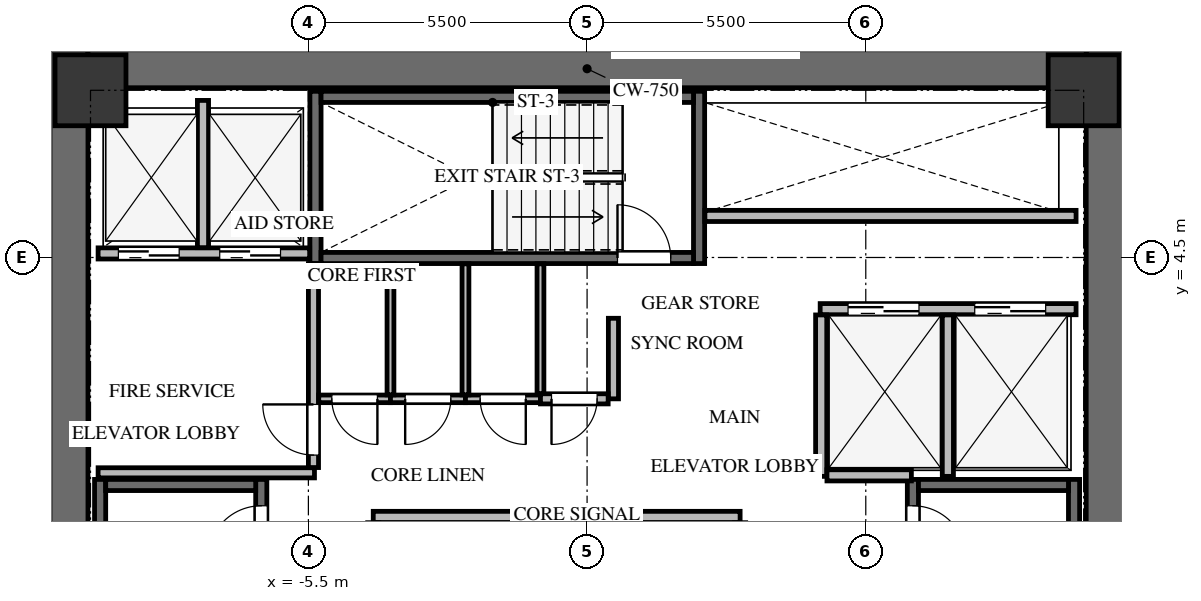
"""IFC4 building model, lengths in metres.
Left out: names, types, materials, properties, quantities, classifications, styles, units other than length and angle.
Written with IfcOpenShell. Run it as: python <this file> out.ifc"""

import sys

from ifc_helpers import new_model, si_unit, direction, frame, frame_2d, origin, origin_2d, place, context, subcontext, project, spatial, rectangle, extrude, source, transform, mapped, element, fill, save


model = new_model("IFC4")
c1 = context("Model", 3, precision=1e-05, world=origin(), true_north=direction((0.0, 1.0)))
c2 = subcontext(c1, "Body", "Model", "MODEL_VIEW")
j1 = project(units=[si_unit("LENGTHUNIT", "METRE"), si_unit("PLANEANGLEUNIT", "RADIAN")], contexts=[c1])
p1 = place(None, origin())
s1 = spatial("IfcSite", under=j1, at=p1, CompositionType="ELEMENT")
p2 = place(p1, origin())
s2 = spatial("IfcBuilding", under=s1, at=p2, CompositionType="ELEMENT")
p3 = place(p2, frame((0.0, 0.0, 123.9)))
s3 = spatial("IfcBuildingStorey", under=s2, at=p3, CompositionType="ELEMENT", Elevation=123.9)
for number, where, z_axis, x_axis in (
    (1, (-10.225, -8.6, 0.0), (0.0, 0.0, 1.0), (0.0, 1.0, 0.0)),
    (2, (10.225, -8.6, 0.0), (0.0, 0.0, 1.0), (0.0, 1.0, 0.0)),
):
    element("IfcWall", number, at=place(p3, frame(where, z_axis=z_axis, x_axis=x_axis)), inside=s3, PredefinedType="SHEAR", context=c2, shape_type="SweptSolid", body=[
        extrude(rectangle(XDim=17.2, YDim=0.75, at=frame_2d((8.6, 0.0))), origin(), (0.0, 0.0, 1.0), 3.3),
    ])
p4 = place(p3, frame((-9.85, 8.225, 0.0), z_axis=(0.0, 0.0, 1.0), x_axis=(1.0, 0.0, 0.0)))
e3 = element("IfcWall", 3, at=p4, inside=s3, PredefinedType="SHEAR", context=c2, shape_type="SweptSolid", body=[
    extrude(rectangle(XDim=19.7, YDim=0.75, at=frame_2d((9.85, 0.0))), origin(), (0.0, 0.0, 1.0), 3.3),
])
p5 = place(p3, frame((-6.43, -7.77, -0.24), z_axis=(0.0, 0.0, 1.0), x_axis=(0.0, 1.0, 0.0)))
e4 = element("IfcWall", 4, at=p5, inside=s3, PredefinedType="SHEAR", context=c2, shape_type="SweptSolid", body=[
    extrude(rectangle(XDim=7.89, YDim=0.22, at=frame_2d((3.945, 0.0))), origin(), (0.0, 0.0, 1.0), 3.3),
])
p6 = place(p5, frame((6.32, 0.0, 0.0)))
e5 = element("IfcOpeningElement", 5, at=p6, cuts=e4, PredefinedType="OPENING", context=c2, shape_type="SweptSolid", body=[
    extrude(rectangle(XDim=1.05, YDim=2.15, at=frame_2d((0.525, 1.075))), frame((0.0, 0.12, 0.0), z_axis=(0.0, -1.0, 0.0), x_axis=(1.0, 0.0, 0.0)), (0.0, 0.0, 1.0), 0.24),
])
p7 = place(p3, frame((-9.61, 0.12, -0.24), z_axis=(0.0, 0.0, 1.0), x_axis=(0.0, -1.0, 0.0)))
e6 = element("IfcWall", 6, at=p7, inside=s3, PredefinedType="SHEAR", context=c2, shape_type="SweptSolid", body=[
    extrude(rectangle(XDim=7.89, YDim=0.22, at=frame_2d((3.945, 0.0))), origin(), (0.0, 0.0, 1.0), 3.3),
])
p8 = place(p3, frame((-6.54, 0.01, -0.24), z_axis=(0.0, 0.0, 1.0), x_axis=(-1.0, 0.0, 0.0)))
e7 = element("IfcWall", 7, at=p8, inside=s3, PredefinedType="SHEAR", context=c2, shape_type="SweptSolid", body=[
    extrude(rectangle(XDim=2.96, YDim=0.22, at=frame_2d((1.48, 0.0))), origin(), (0.0, 0.0, 1.0), 3.3),
])
p9 = place(p3, frame((9.61, -7.77, -0.24), z_axis=(0.0, 0.0, 1.0), x_axis=(0.0, 1.0, 0.0)))
e8 = element("IfcWall", 8, at=p9, inside=s3, PredefinedType="SHEAR", context=c2, shape_type="SweptSolid", body=[
    extrude(rectangle(XDim=7.89, YDim=0.22, at=frame_2d((3.945, 0.0))), origin(), (0.0, 0.0, 1.0), 3.3),
])
p10 = place(p3, frame((6.43, 0.12, -0.24), z_axis=(0.0, 0.0, 1.0), x_axis=(0.0, -1.0, 0.0)))
e9 = element("IfcWall", 9, at=p10, inside=s3, PredefinedType="SHEAR", context=c2, shape_type="SweptSolid", body=[
    extrude(rectangle(XDim=7.89, YDim=0.22, at=frame_2d((3.945, 0.0))), origin(), (0.0, 0.0, 1.0), 3.3),
])
p11 = place(p10, frame((0.52, 0.0, 0.0)))
e10 = element("IfcOpeningElement", 10, at=p11, cuts=e9, PredefinedType="OPENING", context=c2, shape_type="SweptSolid", body=[
    extrude(rectangle(XDim=1.05, YDim=2.15, at=frame_2d((0.525, 1.075))), frame((0.0, 0.12, 0.0), z_axis=(0.0, -1.0, 0.0), x_axis=(1.0, 0.0, 0.0)), (0.0, 0.0, 1.0), 0.24),
])
p12 = place(p3, frame((9.5, 0.01, -0.24), z_axis=(0.0, 0.0, 1.0), x_axis=(-1.0, 0.0, 0.0)))
e11 = element("IfcWall", 11, at=p12, inside=s3, PredefinedType="SHEAR", context=c2, shape_type="SweptSolid", body=[
    extrude(rectangle(XDim=2.96, YDim=0.22, at=frame_2d((1.48, 0.0))), origin(), (0.0, 0.0, 1.0), 3.3),
])
for number, where, z_axis, x_axis in (
    (12, (2.21, 4.38, -0.24), (0.0, 0.0, 1.0), (0.0, 1.0, 0.0)),
    (13, (-5.36, 7.78, -0.24), (0.0, 0.0, 1.0), (0.0, -1.0, 0.0)),
):
    element("IfcWall", number, at=place(p3, frame(where, z_axis=z_axis, x_axis=x_axis)), inside=s3, PredefinedType="SHEAR", context=c2, shape_type="SweptSolid", body=[
        extrude(rectangle(XDim=3.4, YDim=0.22, at=frame_2d((1.7, 0.0))), origin(), (0.0, 0.0, 1.0), 3.3),
    ])
p13 = place(p3, frame((-5.25, 4.49, -0.24), z_axis=(0.0, 0.0, 1.0), x_axis=(1.0, 0.0, 0.0)))
e14 = element("IfcWall", 14, at=p13, inside=s3, PredefinedType="SHEAR", context=c2, shape_type="SweptSolid", body=[
    extrude(rectangle(XDim=7.35, YDim=0.22, at=frame_2d((3.675, 0.0))), origin(), (0.0, 0.0, 1.0), 3.3),
])
p14 = place(p13, frame((5.85, 0.0, 0.0)))
e15 = element("IfcOpeningElement", 15, at=p14, cuts=e14, PredefinedType="OPENING", context=c2, shape_type="SweptSolid", body=[
    extrude(rectangle(XDim=1.05, YDim=2.15, at=frame_2d((0.525, 1.075))), frame((0.0, 0.12, 0.0), z_axis=(0.0, -1.0, 0.0), x_axis=(1.0, 0.0, 0.0)), (0.0, 0.0, 1.0), 0.24),
])
p15 = place(p3, frame((2.1, 7.67, -0.24), z_axis=(0.0, 0.0, 1.0), x_axis=(-1.0, 0.0, 0.0)))
e16 = element("IfcWall", 16, at=p15, inside=s3, PredefinedType="SHEAR", context=c2, shape_type="SweptSolid", body=[
    extrude(rectangle(XDim=7.35, YDim=0.22, at=frame_2d((3.675, 0.0))), origin(), (0.0, 0.0, 1.0), 3.3),
])
m1 = source(origin(), c2, "Body", "SweptSolid", [
    extrude(rectangle(XDim=1.4, YDim=1.4, at=origin_2d()), origin(), (0.0, 0.0, 1.0), 3.3),
])
for number, where, z_axis, x_axis in (
    (17, (9.8, 7.8, -0.24), (0.0, 0.0, 1.0), (1.0, 0.0, 0.0)),
    (18, (-9.8, 7.8, -0.24), (0.0, 0.0, 1.0), (1.0, 0.0, 0.0)),
):
    element("IfcColumn", number, at=place(p3, frame(where, z_axis=z_axis, x_axis=x_axis)), inside=s3, PredefinedType="COLUMN", context=c2, shape_type="MappedRepresentation", body=[
        mapped(m1, transform((0.0, 0.0, 0.0), x_axis=(1.0, 0.0, 0.0), y_axis=(0.0, 1.0, 0.0), z_axis=(0.0, 0.0, 1.0), scale=1.0)),
    ])
p16 = place(p3, frame((-9.65, 4.58, 0.0), z_axis=(0.0, 0.0, 1.0), x_axis=(1.0, 0.0, 0.0)))
e19 = element("IfcWall", 19, at=p16, inside=s3, PredefinedType="SOLIDWALL", context=c2, shape_type="SweptSolid", body=[
    extrude(rectangle(XDim=4.175, YDim=0.22, at=frame_2d((2.087, 0.0))), origin(), (0.0, 0.0, 1.0), 3.045),
])
p17 = place(p16, frame((0.4, 0.0, 0.0)))
e20 = element("IfcOpeningElement", 20, at=p17, cuts=e19, PredefinedType="OPENING", context=c2, shape_type="SweptSolid", body=[
    extrude(rectangle(XDim=1.2, YDim=2.15, at=frame_2d((0.6, 1.075))), frame((0.0, 0.12, 0.0), z_axis=(0.0, -1.0, 0.0), x_axis=(1.0, 0.0, 0.0)), (0.0, 0.0, 1.0), 0.24),
])
p18 = place(p16, frame((2.4, 0.0, 0.0)))
e21 = element("IfcOpeningElement", 21, at=p18, cuts=e19, PredefinedType="OPENING", context=c2, shape_type="SweptSolid", body=[
    extrude(rectangle(XDim=1.2, YDim=2.15, at=frame_2d((0.6, 1.075))), frame((0.0, 0.12, 0.0), z_axis=(0.0, -1.0, 0.0), x_axis=(1.0, 0.0, 0.0)), (0.0, 0.0, 1.0), 0.24),
])
p19 = place(p3, frame((-7.58, 4.694, 0.0), z_axis=(0.0, 0.0, 1.0), x_axis=(0.0, 1.0, 0.0)))
e22 = element("IfcWall", 22, at=p19, inside=s3, PredefinedType="SOLIDWALL", context=c2, shape_type="SweptSolid", body=[
    extrude(rectangle(XDim=2.906, YDim=0.22, at=frame_2d((1.453, 0.0))), origin(), (0.0, 0.0, 1.0), 3.045),
])
p20 = place(p3, frame((-9.65, 0.25, 0.0), z_axis=(0.0, 0.0, 1.0), x_axis=(1.0, 0.0, 0.0)))
e23 = element("IfcWall", 23, at=p20, inside=s3, PredefinedType="SOLIDWALL", context=c2, shape_type="SweptSolid", body=[
    extrude(rectangle(XDim=4.27, YDim=0.2, at=frame_2d((2.135, 0.0))), origin(), (0.0, 0.0, 1.0), 3.045),
])
p21 = place(p3, frame((-5.4, 0.354, 0.0), z_axis=(0.0, 0.0, 1.0), x_axis=(0.0, 1.0, 0.0)))
e24 = element("IfcWall", 24, at=p21, inside=s3, PredefinedType="SOLIDWALL", context=c2, shape_type="SweptSolid", body=[
    extrude(rectangle(XDim=4.026, YDim=0.2, at=frame_2d((2.013, 0.0))), origin(), (0.0, 0.0, 1.0), 3.045),
])
p22 = place(p21, frame((0.246, 0.0, 0.0)))
e25 = element("IfcOpeningElement", 25, at=p22, cuts=e24, PredefinedType="OPENING", context=c2, shape_type="SweptSolid", body=[
    extrude(rectangle(XDim=1.0, YDim=2.15, at=frame_2d((0.5, 1.075))), frame((0.0, 0.11, 0.0), z_axis=(0.0, -1.0, 0.0), x_axis=(1.0, 0.0, 0.0)), (0.0, 0.0, 1.0), 0.22),
])
p23 = place(p3, frame((4.6, 3.48, 0.0), z_axis=(0.0, 0.0, 1.0), x_axis=(1.0, 0.0, 0.0)))
e26 = element("IfcWall", 26, at=p23, inside=s3, PredefinedType="SOLIDWALL", context=c2, shape_type="SweptSolid", body=[
    extrude(rectangle(XDim=5.05, YDim=0.22, at=frame_2d((2.525, 0.0))), origin(), (0.0, 0.0, 1.0), 3.045),
])
p24 = place(p23, frame((0.55, 0.0, 0.0)))
e27 = element("IfcOpeningElement", 27, at=p24, cuts=e26, PredefinedType="OPENING", context=c2, shape_type="SweptSolid", body=[
    extrude(rectangle(XDim=1.4, YDim=2.15, at=frame_2d((0.7, 1.075))), frame((0.0, 0.12, 0.0), z_axis=(0.0, -1.0, 0.0), x_axis=(1.0, 0.0, 0.0)), (0.0, 0.0, 1.0), 0.24),
])
p25 = place(p23, frame((3.05, 0.0, 0.0)))
e28 = element("IfcOpeningElement", 28, at=p25, cuts=e26, PredefinedType="OPENING", context=c2, shape_type="SweptSolid", body=[
    extrude(rectangle(XDim=1.4, YDim=2.15, at=frame_2d((0.7, 1.075))), frame((0.0, 0.12, 0.0), z_axis=(0.0, -1.0, 0.0), x_axis=(1.0, 0.0, 0.0)), (0.0, 0.0, 1.0), 0.24),
])
for number, where, z_axis, x_axis in (
    (29, (4.62, 0.18, 0.0), (0.0, 0.0, 1.0), (0.0, 1.0, 0.0)),
    (30, (7.12, 0.18, 0.0), (0.0, 0.0, 1.0), (0.0, 1.0, 0.0)),
):
    element("IfcWall", number, at=place(p3, frame(where, z_axis=z_axis, x_axis=x_axis)), inside=s3, PredefinedType="SOLIDWALL", context=c2, shape_type="SweptSolid", body=[
        extrude(rectangle(XDim=3.186, YDim=0.22, at=frame_2d((1.593, 0.0))), origin(), (0.0, 0.0, 1.0), 3.045),
    ])
p26 = place(p3, frame((4.734, 0.2, 0.0), z_axis=(0.0, 0.0, 1.0), x_axis=(1.0, 0.0, 0.0)))
e31 = element("IfcWall", 31, at=p26, inside=s3, PredefinedType="SOLIDWALL", context=c2, shape_type="SweptSolid", body=[
    extrude(rectangle(XDim=1.666, YDim=0.22, at=frame_2d((0.833, 0.0))), origin(), (0.0, 0.0, 1.0), 3.045),
])
p27 = place(p3, frame((-4.22, -0.62, 0.0), z_axis=(0.0, 0.0, 1.0), x_axis=(1.0, 0.0, 0.0)))
e32 = element("IfcWall", 32, at=p27, inside=s3, PredefinedType="SOLIDWALL", context=c2, shape_type="SweptSolid", body=[
    extrude(rectangle(XDim=7.24, YDim=0.22, at=frame_2d((3.62, 0.0))), origin(), (0.0, 0.0, 1.0), 3.045),
])
p28 = place(p3, frame((2.325, 5.32, 0.0), z_axis=(0.0, 0.0, 1.0), x_axis=(1.0, 0.0, 0.0)))
e33 = element("IfcWall", 33, at=p28, inside=s3, PredefinedType="SOLIDWALL", context=c2, shape_type="SweptSolid", body=[
    extrude(rectangle(XDim=7.325, YDim=0.22, at=frame_2d((3.663, 0.0))), origin(), (0.0, 0.0, 1.0), 3.045),
])
p29 = place(p3, frame((-3.88, 1.71, 0.0), z_axis=(0.0, 0.0, 1.0), x_axis=(-1.0, 0.0, 0.0)))
e34 = element("IfcWall", 34, at=p29, inside=s3, PredefinedType="PARTITIONING", context=c2, shape_type="SweptSolid", body=[
    extrude(rectangle(XDim=1.416, YDim=0.15, at=frame_2d((0.708, 0.0))), origin(), (0.0, 0.0, 1.0), 3.045),
])
p30 = place(p29, frame((0.258, 0.0, 0.0)))
e35 = element("IfcOpeningElement", 35, at=p30, cuts=e34, PredefinedType="OPENING", context=c2, shape_type="SweptSolid", body=[
    extrude(rectangle(XDim=0.9, YDim=2.05, at=frame_2d((0.45, 1.025))), frame((0.0, 0.085, 0.0), z_axis=(0.0, -1.0, 0.0), x_axis=(1.0, 0.0, 0.0)), (0.0, 0.0, 1.0), 0.17),
])
p31 = place(p3, frame((-2.4, 1.71, 0.0), z_axis=(0.0, 0.0, 1.0), x_axis=(-1.0, 0.0, 0.0)))
e36 = element("IfcWall", 36, at=p31, inside=s3, PredefinedType="PARTITIONING", context=c2, shape_type="SweptSolid", body=[
    extrude(rectangle(XDim=1.48, YDim=0.15, at=frame_2d((0.74, 0.0))), origin(), (0.0, 0.0, 1.0), 3.045),
])
p32 = place(p31, frame((0.29, 0.0, 0.0)))
e37 = element("IfcOpeningElement", 37, at=p32, cuts=e36, PredefinedType="OPENING", context=c2, shape_type="SweptSolid", body=[
    extrude(rectangle(XDim=0.9, YDim=2.05, at=frame_2d((0.45, 1.025))), frame((0.0, 0.085, 0.0), z_axis=(0.0, -1.0, 0.0), x_axis=(1.0, 0.0, 0.0)), (0.0, 0.0, 1.0), 0.17),
])
p33 = place(p3, frame((-0.92, 1.71, 0.0), z_axis=(0.0, 0.0, 1.0), x_axis=(-1.0, 0.0, 0.0)))
e38 = element("IfcWall", 38, at=p33, inside=s3, PredefinedType="PARTITIONING", context=c2, shape_type="SweptSolid", body=[
    extrude(rectangle(XDim=1.48, YDim=0.15, at=frame_2d((0.74, 0.0))), origin(), (0.0, 0.0, 1.0), 3.045),
])
p34 = place(p33, frame((0.29, 0.0, 0.0)))
e39 = element("IfcOpeningElement", 39, at=p34, cuts=e38, PredefinedType="OPENING", context=c2, shape_type="SweptSolid", body=[
    extrude(rectangle(XDim=0.9, YDim=2.05, at=frame_2d((0.45, 1.025))), frame((0.0, 0.085, 0.0), z_axis=(0.0, -1.0, 0.0), x_axis=(1.0, 0.0, 0.0)), (0.0, 0.0, 1.0), 0.17),
])
p35 = place(p3, frame((0.52, 3.3, 0.0), z_axis=(0.0, 0.0, 1.0), x_axis=(0.0, -1.0, 0.0)))
e40 = element("IfcWall", 40, at=p35, inside=s3, PredefinedType="SOLIDWALL", context=c2, shape_type="SweptSolid", body=[
    extrude(rectangle(XDim=1.59, YDim=0.2, at=frame_2d((0.795, 0.0))), origin(), (0.0, 0.0, 1.0), 3.045),
])
p36 = place(p3, frame((0.416, 1.71, 0.0), z_axis=(0.0, 0.0, 1.0), x_axis=(-1.0, 0.0, 0.0)))
e41 = element("IfcWall", 41, at=p36, inside=s3, PredefinedType="SOLIDWALL", context=c2, shape_type="SweptSolid", body=[
    extrude(rectangle(XDim=1.336, YDim=0.2, at=frame_2d((0.668, 0.0))), origin(), (0.0, 0.0, 1.0), 3.045),
])
p37 = place(p36, frame((0.218, 0.0, 0.0)))
e42 = element("IfcOpeningElement", 42, at=p37, cuts=e41, PredefinedType="OPENING", context=c2, shape_type="SweptSolid", body=[
    extrude(rectangle(XDim=0.9, YDim=2.05, at=frame_2d((0.45, 1.025))), frame((0.0, 0.11, 0.0), z_axis=(0.0, -1.0, 0.0), x_axis=(1.0, 0.0, 0.0)), (0.0, 0.0, 1.0), 0.22),
])
for number, where, z_axis, x_axis in (
    (43, (-3.88, 4.375, 0.0), (0.0, 0.0, 1.0), (0.0, -1.0, 0.0)),
    (44, (-2.4, 4.375, 0.0), (0.0, 0.0, 1.0), (0.0, -1.0, 0.0)),
):
    element("IfcWall", number, at=place(p3, frame(where, z_axis=z_axis, x_axis=x_axis)), inside=s3, PredefinedType="PARTITIONING", context=c2, shape_type="SweptSolid", body=[
        extrude(rectangle(XDim=2.586, YDim=0.135, at=frame_2d((1.293, 0.0))), origin(), (0.0, 0.0, 1.0), 3.045),
    ])
p38 = place(p3, frame((-0.92, 4.375, 0.0), z_axis=(0.0, 0.0, 1.0), x_axis=(0.0, -1.0, 0.0)))
e45 = element("IfcWall", 45, at=p38, inside=s3, PredefinedType="PARTITIONING", context=c2, shape_type="SweptSolid", body=[
    extrude(rectangle(XDim=2.561, YDim=0.135, at=frame_2d((1.281, 0.0))), origin(), (0.0, 0.0, 1.0), 3.045),
])
m2 = source(origin(), c2, "Body", "SweptSolid", [
    extrude(rectangle(XDim=1.05, YDim=2.15, at=frame_2d((0.525, 1.075))), frame((0.0, 0.025, 0.0), z_axis=(0.0, -1.0, 0.0), x_axis=(1.0, 0.0, 0.0)), (0.0, 0.0, 1.0), 0.05),
])
p39 = place(p6, origin())
e46 = element("IfcDoor", 46, at=p39, inside=s3, OperationType="SINGLE_SWING_LEFT", PredefinedType="DOOR", context=c2, shape_type="MappedRepresentation", body=[
    mapped(m2, transform((0.0, 0.0, 0.0), x_axis=(1.0, 0.0, 0.0), y_axis=(0.0, 1.0, 0.0), z_axis=(0.0, 0.0, 1.0), scale=1.0)),
])
fill(e5, e46)
m3 = source(origin(), c2, "Body", "SweptSolid", [
    extrude(rectangle(XDim=1.05, YDim=2.15, at=frame_2d((0.525, 1.075))), frame((0.0, 0.025, 0.0), z_axis=(0.0, -1.0, 0.0), x_axis=(1.0, 0.0, 0.0)), (0.0, 0.0, 1.0), 0.05),
])
p40 = place(p11, origin())
e47 = element("IfcDoor", 47, at=p40, inside=s3, OperationType="SINGLE_SWING_RIGHT", PredefinedType="DOOR", context=c2, shape_type="MappedRepresentation", body=[
    mapped(m3, transform((0.0, 0.0, 0.0), x_axis=(1.0, 0.0, 0.0), y_axis=(0.0, 1.0, 0.0), z_axis=(0.0, 0.0, 1.0), scale=1.0)),
])
fill(e10, e47)
p41 = place(p14, origin())
e48 = element("IfcDoor", 48, at=p41, inside=s3, OperationType="SINGLE_SWING_LEFT", PredefinedType="DOOR", context=c2, shape_type="MappedRepresentation", body=[
    mapped(m2, transform((0.0, 0.0, 0.0), x_axis=(1.0, 0.0, 0.0), y_axis=(0.0, 1.0, 0.0), z_axis=(0.0, 0.0, 1.0), scale=1.0)),
])
fill(e15, e48)
m4 = source(origin(), c2, "Body", "SweptSolid", [
    extrude(rectangle(XDim=1.2, YDim=2.15, at=frame_2d((0.6, 1.075))), frame((0.0, 0.025, 0.0), z_axis=(0.0, -1.0, 0.0), x_axis=(1.0, 0.0, 0.0)), (0.0, 0.0, 1.0), 0.05),
])
p42 = place(p17, origin())
e49 = element("IfcDoor", 49, at=p42, inside=s3, OperationType="DOUBLE_DOOR_SLIDING", PredefinedType="DOOR", context=c2, shape_type="MappedRepresentation", body=[
    mapped(m4, transform((0.0, 0.0, 0.0), x_axis=(1.0, 0.0, 0.0), y_axis=(0.0, 1.0, 0.0), z_axis=(0.0, 0.0, 1.0), scale=1.0)),
])
fill(e20, e49)
p43 = place(p18, origin())
e50 = element("IfcDoor", 50, at=p43, inside=s3, OperationType="DOUBLE_DOOR_SLIDING", PredefinedType="DOOR", context=c2, shape_type="MappedRepresentation", body=[
    mapped(m4, transform((0.0, 0.0, 0.0), x_axis=(1.0, 0.0, 0.0), y_axis=(0.0, 1.0, 0.0), z_axis=(0.0, 0.0, 1.0), scale=1.0)),
])
fill(e21, e50)
m5 = source(origin(), c2, "Body", "SweptSolid", [
    extrude(rectangle(XDim=1.0, YDim=2.15, at=frame_2d((0.5, 1.075))), frame((0.0, 0.025, 0.0), z_axis=(0.0, -1.0, 0.0), x_axis=(1.0, 0.0, 0.0)), (0.0, 0.0, 1.0), 0.05),
])
p44 = place(p22, origin())
e51 = element("IfcDoor", 51, at=p44, inside=s3, OperationType="SINGLE_SWING_RIGHT", PredefinedType="DOOR", context=c2, shape_type="MappedRepresentation", body=[
    mapped(m5, transform((0.0, 0.0, 0.0), x_axis=(1.0, 0.0, 0.0), y_axis=(0.0, 1.0, 0.0), z_axis=(0.0, 0.0, 1.0), scale=1.0)),
])
fill(e25, e51)
m6 = source(origin(), c2, "Body", "SweptSolid", [
    extrude(rectangle(XDim=1.4, YDim=2.15, at=frame_2d((0.7, 1.075))), frame((0.0, 0.025, 0.0), z_axis=(0.0, -1.0, 0.0), x_axis=(1.0, 0.0, 0.0)), (0.0, 0.0, 1.0), 0.05),
])
p45 = place(p24, origin())
e52 = element("IfcDoor", 52, at=p45, inside=s3, OperationType="DOUBLE_DOOR_SLIDING", PredefinedType="DOOR", context=c2, shape_type="MappedRepresentation", body=[
    mapped(m6, transform((0.0, 0.0, 0.0), x_axis=(1.0, 0.0, 0.0), y_axis=(0.0, 1.0, 0.0), z_axis=(0.0, 0.0, 1.0), scale=1.0)),
])
fill(e27, e52)
p46 = place(p25, origin())
e53 = element("IfcDoor", 53, at=p46, inside=s3, OperationType="DOUBLE_DOOR_SLIDING", PredefinedType="DOOR", context=c2, shape_type="MappedRepresentation", body=[
    mapped(m6, transform((0.0, 0.0, 0.0), x_axis=(1.0, 0.0, 0.0), y_axis=(0.0, 1.0, 0.0), z_axis=(0.0, 0.0, 1.0), scale=1.0)),
])
fill(e28, e53)
m7 = source(origin(), c2, "Body", "SweptSolid", [
    extrude(rectangle(XDim=0.9, YDim=2.05, at=frame_2d((0.45, 1.025))), frame((0.0, 0.025, 0.0), z_axis=(0.0, -1.0, 0.0), x_axis=(1.0, 0.0, 0.0)), (0.0, 0.0, 1.0), 0.05),
])
p47 = place(p30, origin())
e54 = element("IfcDoor", 54, at=p47, inside=s3, OperationType="SINGLE_SWING_LEFT", PredefinedType="DOOR", context=c2, shape_type="MappedRepresentation", body=[
    mapped(m7, transform((0.0, 0.0, 0.0), x_axis=(1.0, 0.0, 0.0), y_axis=(0.0, 1.0, 0.0), z_axis=(0.0, 0.0, 1.0), scale=1.0)),
])
fill(e35, e54)
m8 = source(origin(), c2, "Body", "SweptSolid", [
    extrude(rectangle(XDim=0.9, YDim=2.05, at=frame_2d((0.45, 1.025))), frame((0.0, 0.025, 0.0), z_axis=(0.0, -1.0, 0.0), x_axis=(1.0, 0.0, 0.0)), (0.0, 0.0, 1.0), 0.05),
])
p48 = place(p32, origin())
e55 = element("IfcDoor", 55, at=p48, inside=s3, OperationType="SINGLE_SWING_RIGHT", PredefinedType="DOOR", context=c2, shape_type="MappedRepresentation", body=[
    mapped(m8, transform((0.0, 0.0, 0.0), x_axis=(1.0, 0.0, 0.0), y_axis=(0.0, 1.0, 0.0), z_axis=(0.0, 0.0, 1.0), scale=1.0)),
])
fill(e37, e55)
p49 = place(p34, origin())
e56 = element("IfcDoor", 56, at=p49, inside=s3, OperationType="SINGLE_SWING_LEFT", PredefinedType="DOOR", context=c2, shape_type="MappedRepresentation", body=[
    mapped(m7, transform((0.0, 0.0, 0.0), x_axis=(1.0, 0.0, 0.0), y_axis=(0.0, 1.0, 0.0), z_axis=(0.0, 0.0, 1.0), scale=1.0)),
])
fill(e39, e56)
p50 = place(p37, origin())
e57 = element("IfcDoor", 57, at=p50, inside=s3, OperationType="SINGLE_SWING_RIGHT", PredefinedType="DOOR", context=c2, shape_type="MappedRepresentation", body=[
    mapped(m8, transform((0.0, 0.0, 0.0), x_axis=(1.0, 0.0, 0.0), y_axis=(0.0, 1.0, 0.0), z_axis=(0.0, 0.0, 1.0), scale=1.0)),
])
fill(e42, e57)
save(model, sys.argv[1])
